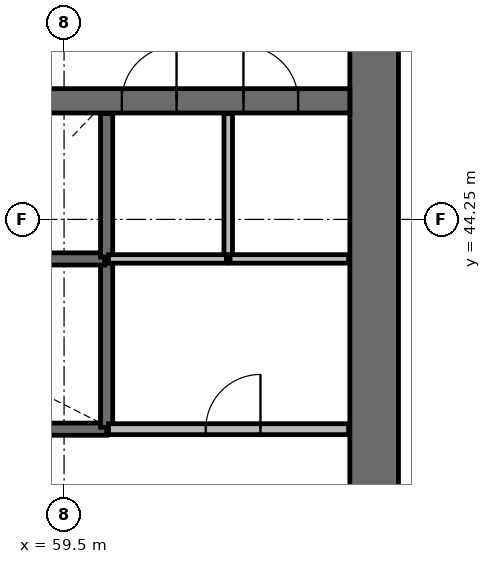
"""IFC4 building model, lengths in metres.
Left out: names, types, materials, properties, quantities, classifications, styles, units other than length and angle.
Written with IfcOpenShell. Run it as: python <this file> out.ifc"""

import sys

from ifc_helpers import new_model, si_unit, direction, frame, frame_2d, origin, place, context, subcontext, project, spatial, rectangle, extrude, source, transform, mapped, element, fill, save


model = new_model("IFC4")
c1 = context("Model", 3, precision=1e-05, world=origin(), true_north=direction((0.0, 1.0)))
c2 = subcontext(c1, "Body", "Model", "MODEL_VIEW")
j1 = project(units=[si_unit("LENGTHUNIT", "METRE"), si_unit("PLANEANGLEUNIT", "RADIAN")], contexts=[c1])
p1 = place(None, origin())
s1 = spatial("IfcSite", under=j1, at=p1, CompositionType="ELEMENT")
p2 = place(p1, origin())
s2 = spatial("IfcBuilding", under=s1, at=p2, CompositionType="ELEMENT")
p3 = place(p2, frame((0.0, 0.0, 79.8)))
s3 = spatial("IfcBuildingStorey", under=s2, at=p3, CompositionType="ELEMENT", Elevation=79.8)
p4 = place(p3, frame((64.6, 38.0, 0.0), z_axis=(0.0, 0.0, 1.0), x_axis=(0.0, 1.0, 0.0)))
e1 = element("IfcWall", 1, at=p4, inside=s3, PredefinedType="SHEAR", context=c2, shape_type="SweptSolid", body=[
    extrude(rectangle(XDim=20.0, YDim=0.8, at=frame_2d((10.0, 0.0))), origin(), (0.0, 0.0, 1.0), 4.1),
])
p5 = place(p4, frame((9.1, 0.0, 0.0)))
e2 = element("IfcOpeningElement", 2, at=p5, cuts=e1, PredefinedType="OPENING", context=c2, shape_type="SweptSolid", body=[
    extrude(rectangle(XDim=1.8, YDim=2.1, at=frame_2d((0.9, 1.05))), frame((0.0, 0.41, 0.0), z_axis=(0.0, -1.0, 0.0), x_axis=(1.0, 0.0, 0.0)), (0.0, 0.0, 1.0), 0.82),
])
p6 = place(p3, frame((39.8, 46.2, 0.0), z_axis=(0.0, 0.0, 1.0), x_axis=(1.0, 0.0, 0.0)))
e3 = element("IfcWall", 3, at=p6, inside=s3, PredefinedType="SHEAR", context=c2, shape_type="SweptSolid", body=[
    extrude(rectangle(XDim=24.4, YDim=0.4, at=frame_2d((12.2, 0.0))), origin(), (0.0, 0.0, 1.0), 4.1),
])
p7 = place(p6, frame((4.7, 0.0, 0.0)))
e4 = element("IfcOpeningElement", 4, at=p7, cuts=e3, PredefinedType="OPENING", context=c2, shape_type="SweptSolid", body=[
    extrude(rectangle(XDim=1.1, YDim=2.1, at=frame_2d((0.55, 1.05))), frame((0.0, 0.21, 0.0), z_axis=(0.0, -1.0, 0.0), x_axis=(1.0, 0.0, 0.0)), (0.0, 0.0, 1.0), 0.42),
])
p8 = place(p6, frame((7.2, 0.0, 0.0)))
e5 = element("IfcOpeningElement", 5, at=p8, cuts=e3, PredefinedType="OPENING", context=c2, shape_type="SweptSolid", body=[
    extrude(rectangle(XDim=1.1, YDim=2.1, at=frame_2d((0.55, 1.05))), frame((0.0, 0.21, 0.0), z_axis=(0.0, -1.0, 0.0), x_axis=(1.0, 0.0, 0.0)), (0.0, 0.0, 1.0), 0.42),
])
p9 = place(p6, frame((9.7, 0.0, 0.0)))
e6 = element("IfcOpeningElement", 6, at=p9, cuts=e3, PredefinedType="OPENING", context=c2, shape_type="SweptSolid", body=[
    extrude(rectangle(XDim=1.1, YDim=2.1, at=frame_2d((0.55, 1.05))), frame((0.0, 0.21, 0.0), z_axis=(0.0, -1.0, 0.0), x_axis=(1.0, 0.0, 0.0)), (0.0, 0.0, 1.0), 0.42),
])
p10 = place(p6, frame((20.65, 0.0, 0.0)))
e7 = element("IfcOpeningElement", 7, at=p10, cuts=e3, PredefinedType="OPENING", context=c2, shape_type="SweptSolid", body=[
    extrude(rectangle(XDim=0.9, YDim=2.1, at=frame_2d((0.45, 1.05))), frame((0.0, 0.21, 0.0), z_axis=(0.0, -1.0, 0.0), x_axis=(1.0, 0.0, 0.0)), (0.0, 0.0, 1.0), 0.42),
])
p11 = place(p6, frame((22.65, 0.0, 0.0)))
e8 = element("IfcOpeningElement", 8, at=p11, cuts=e3, PredefinedType="OPENING", context=c2, shape_type="SweptSolid", body=[
    extrude(rectangle(XDim=0.9, YDim=2.1, at=frame_2d((0.45, 1.05))), frame((0.0, 0.21, 0.0), z_axis=(0.0, -1.0, 0.0), x_axis=(1.0, 0.0, 0.0)), (0.0, 0.0, 1.0), 0.42),
])
p12 = place(p6, frame((0.85, 0.0, 0.0)))
e9 = element("IfcOpeningElement", 9, at=p12, cuts=e3, PredefinedType="OPENING", context=c2, shape_type="SweptSolid", body=[
    extrude(rectangle(XDim=0.9, YDim=2.1, at=frame_2d((0.45, 1.05))), frame((0.0, 0.21, 0.0), z_axis=(0.0, -1.0, 0.0), x_axis=(1.0, 0.0, 0.0)), (0.0, 0.0, 1.0), 0.42),
])
p13 = place(p6, frame((2.85, 0.0, 0.0)))
e10 = element("IfcOpeningElement", 10, at=p13, cuts=e3, PredefinedType="OPENING", context=c2, shape_type="SweptSolid", body=[
    extrude(rectangle(XDim=0.9, YDim=2.1, at=frame_2d((0.45, 1.05))), frame((0.0, 0.21, 0.0), z_axis=(0.0, -1.0, 0.0), x_axis=(1.0, 0.0, 0.0)), (0.0, 0.0, 1.0), 0.42),
])
p14 = place(p6, frame((11.85, 0.0, 0.0)))
e11 = element("IfcOpeningElement", 11, at=p14, cuts=e3, PredefinedType="OPENING", context=c2, shape_type="SweptSolid", body=[
    extrude(rectangle(XDim=0.9, YDim=2.1, at=frame_2d((0.45, 1.05))), frame((0.0, 0.21, 0.0), z_axis=(0.0, -1.0, 0.0), x_axis=(1.0, 0.0, 0.0)), (0.0, 0.0, 1.0), 0.42),
])
p15 = place(p3, frame((53.6, 40.8, 0.0), z_axis=(0.0, 0.0, 1.0), x_axis=(1.0, 0.0, 0.0)))
e12 = element("IfcWall", 12, at=p15, inside=s3, PredefinedType="SOLIDWALL", context=c2, shape_type="SweptSolid", body=[
    extrude(rectangle(XDim=6.6, YDim=0.2, at=frame_2d((3.3, 0.0))), origin(), (0.0, 0.0, 1.0), 3.7),
])
p16 = place(p15, frame((0.3, 0.0, 0.0)))
e13 = element("IfcOpeningElement", 13, at=p16, cuts=e12, PredefinedType="OPENING", context=c2, shape_type="SweptSolid", body=[
    extrude(rectangle(XDim=1.2, YDim=2.1, at=frame_2d((0.6, 1.05))), frame((0.0, 0.11, 0.0), z_axis=(0.0, -1.0, 0.0), x_axis=(1.0, 0.0, 0.0)), (0.0, 0.0, 1.0), 0.22),
])
p17 = place(p3, frame((60.2, 40.83, 0.0), z_axis=(0.0, 0.0, 1.0), x_axis=(0.0, 1.0, 0.0)))
e14 = element("IfcWall", 14, at=p17, inside=s3, PredefinedType="SOLIDWALL", context=c2, shape_type="SweptSolid", body=[
    extrude(rectangle(XDim=2.77, YDim=0.2, at=frame_2d((1.385, 0.0))), origin(), (0.0, 0.0, 1.0), 3.7),
])
p18 = place(p3, frame((57.73, 43.6, 0.0), z_axis=(0.0, 0.0, 1.0), x_axis=(1.0, 0.0, 0.0)))
e15 = element("IfcWall", 15, at=p18, inside=s3, PredefinedType="SOLIDWALL", context=c2, shape_type="SweptSolid", body=[
    extrude(rectangle(XDim=2.44, YDim=0.2, at=frame_2d((1.22, 0.0))), origin(), (0.0, 0.0, 1.0), 3.7),
])
p19 = place(p3, frame((60.2, 43.63, 0.0), z_axis=(0.0, 0.0, 1.0), x_axis=(0.0, 1.0, 0.0)))
e16 = element("IfcWall", 16, at=p19, inside=s3, PredefinedType="SOLIDWALL", context=c2, shape_type="SweptSolid", body=[
    extrude(rectangle(XDim=2.36, YDim=0.2, at=frame_2d((1.18, 0.0))), origin(), (0.0, 0.0, 1.0), 3.7),
])
p20 = place(p3, frame((60.23, 40.8, 0.0), z_axis=(0.0, 0.0, 1.0), x_axis=(1.0, 0.0, 0.0)))
e17 = element("IfcWall", 17, at=p20, inside=s3, PredefinedType="PARTITIONING", context=c2, shape_type="SweptSolid", body=[
    extrude(rectangle(XDim=3.95, YDim=0.18, at=frame_2d((1.975, 0.0))), origin(), (0.0, 0.0, 1.0), 3.7),
])
p21 = place(p20, frame((1.6, 0.0, 0.0)))
e18 = element("IfcOpeningElement", 18, at=p21, cuts=e17, PredefinedType="OPENING", context=c2, shape_type="SweptSolid", body=[
    extrude(rectangle(XDim=0.9, YDim=2.1, at=frame_2d((0.45, 1.05))), frame((0.0, 0.1, 0.0), z_axis=(0.0, -1.0, 0.0), x_axis=(1.0, 0.0, 0.0)), (0.0, 0.0, 1.0), 0.2),
])
p22 = place(p3, frame((62.2, 43.6, 0.0), z_axis=(0.0, 0.0, 1.0), x_axis=(0.0, 1.0, 0.0)))
e19 = element("IfcWall", 19, at=p22, inside=s3, PredefinedType="PARTITIONING", context=c2, shape_type="SweptSolid", body=[
    extrude(rectangle(XDim=2.39, YDim=0.14, at=frame_2d((1.195, 0.0))), origin(), (0.0, 0.0, 1.0), 2.9),
])
p23 = place(p3, frame((60.23, 43.6, 0.0), z_axis=(0.0, 0.0, 1.0), x_axis=(1.0, 0.0, 0.0)))
e20 = element("IfcWall", 20, at=p23, inside=s3, PredefinedType="PARTITIONING", context=c2, shape_type="SweptSolid", body=[
    extrude(rectangle(XDim=1.94, YDim=0.14, at=frame_2d((0.97, 0.0))), origin(), (0.0, 0.0, 1.0), 2.9),
])
p24 = place(p3, frame((62.23, 43.6, 0.0), z_axis=(0.0, 0.0, 1.0), x_axis=(1.0, 0.0, 0.0)))
e21 = element("IfcWall", 21, at=p24, inside=s3, PredefinedType="PARTITIONING", context=c2, shape_type="SweptSolid", body=[
    extrude(rectangle(XDim=1.95, YDim=0.14, at=frame_2d((0.975, 0.0))), origin(), (0.0, 0.0, 1.0), 2.9),
])
m1 = source(origin(), c2, "Body", "SweptSolid", [
    extrude(rectangle(XDim=0.9, YDim=2.1, at=frame_2d((0.45, 1.05))), frame((0.0, 0.025, 0.0), z_axis=(0.0, -1.0, 0.0), x_axis=(1.0, 0.0, 0.0)), (0.0, 0.0, 1.0), 0.05),
])
p25 = place(p10, origin())
e22 = element("IfcDoor", 22, at=p25, inside=s3, OperationType="SINGLE_SWING_RIGHT", PredefinedType="DOOR", context=c2, shape_type="MappedRepresentation", body=[
    mapped(m1, transform((0.0, 0.0, 0.0), scale=1.0)),
])
fill(e7, e22)
p26 = place(p11, origin())
e23 = element("IfcDoor", 23, at=p26, inside=s3, OperationType="SINGLE_SWING_LEFT", PredefinedType="DOOR", context=c2, shape_type="MappedRepresentation", body=[
    mapped(m1, transform((0.0, 0.0, 0.0), scale=1.0)),
])
fill(e8, e23)
p27 = place(p21, origin())
e24 = element("IfcDoor", 24, at=p27, inside=s3, OperationType="SINGLE_SWING_RIGHT", PredefinedType="DOOR", context=c2, shape_type="MappedRepresentation", body=[
    mapped(m1, transform((0.0, 0.0, 0.0), scale=1.0)),
])
fill(e18, e24)
save(model, sys.argv[1])
